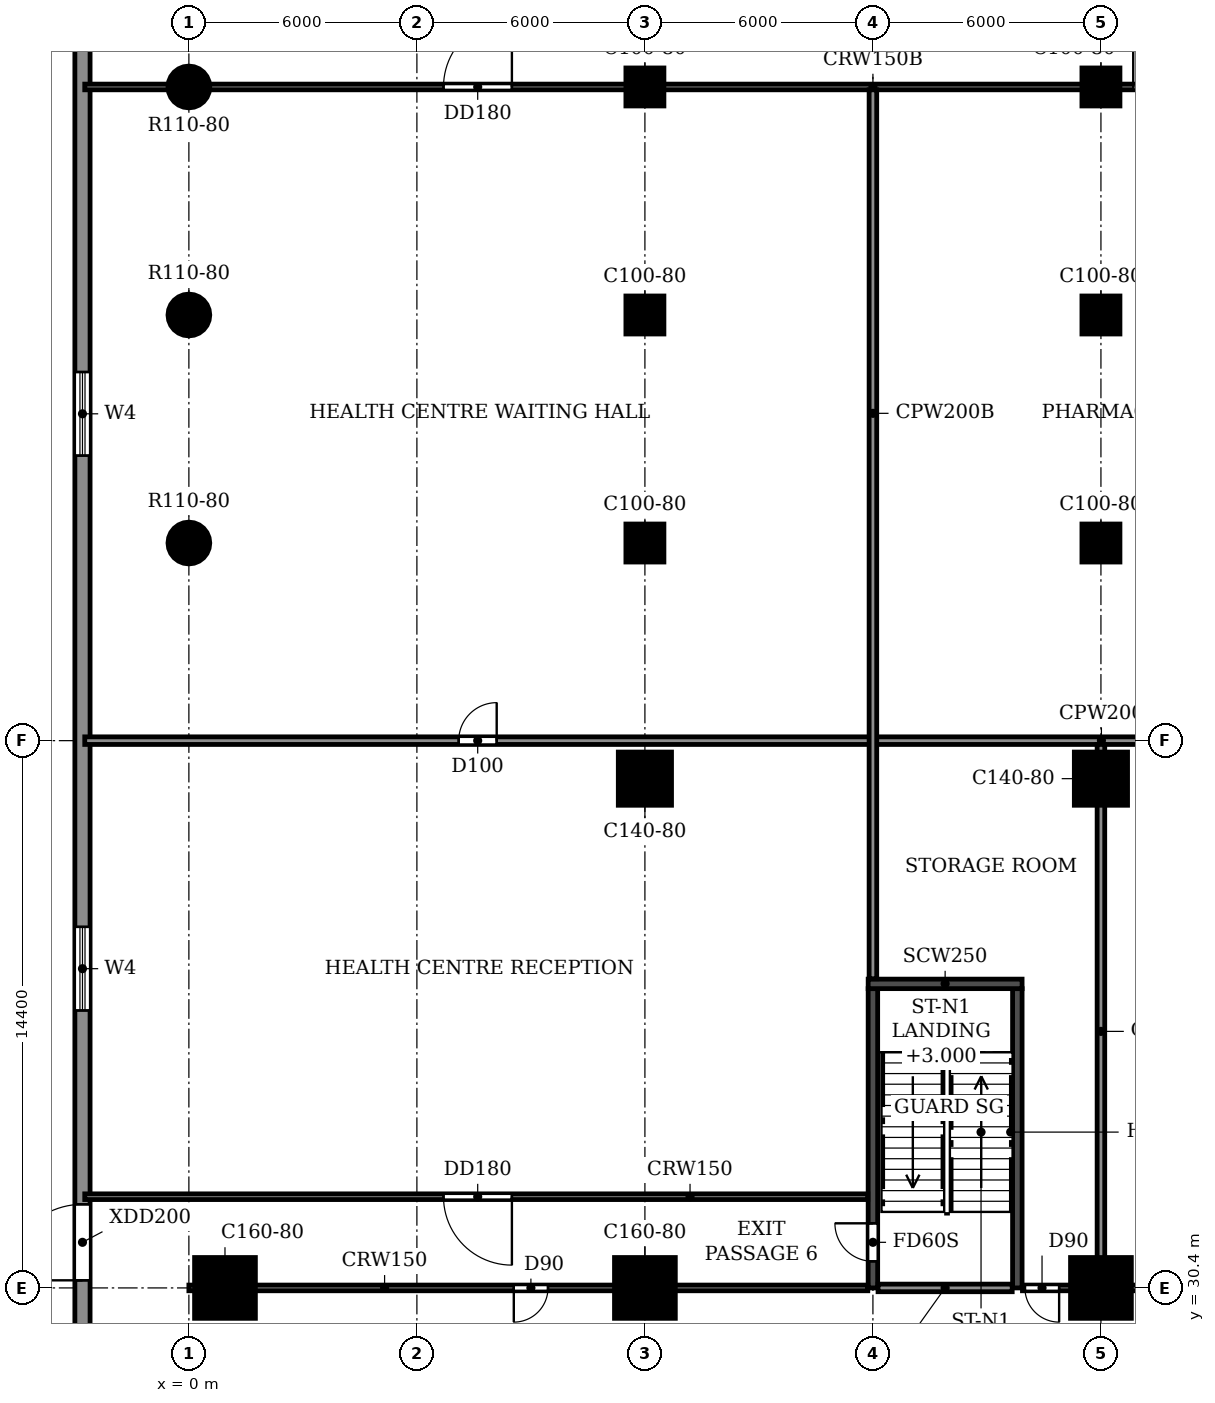
"""IFC4 building model, lengths in metres.
Left out: names, types, materials, properties, quantities, classifications, styles, units other than length and angle.
Written with IfcOpenShell. Run it as: python <this file> out.ifc"""

import sys

from ifc_helpers import new_model, si_unit, direction, frame, frame_2d, origin, origin_2d, place, context, subcontext, project, spatial, rectangle, circle, extrude, source, transform, mapped, element, fill, save


model = new_model("IFC4")
c1 = context("Model", 3, precision=1e-05, world=origin(), true_north=direction((0.0, 1.0)))
c2 = subcontext(c1, "Body", "Model", "MODEL_VIEW")
j1 = project(units=[si_unit("LENGTHUNIT", "METRE"), si_unit("PLANEANGLEUNIT", "RADIAN")], contexts=[c1])
p1 = place(None, origin())
s1 = spatial("IfcSite", under=j1, at=p1, CompositionType="ELEMENT")
p2 = place(p1, origin())
s2 = spatial("IfcBuilding", under=s1, at=p2, CompositionType="ELEMENT")
p3 = place(p2, origin())
s3 = spatial("IfcBuildingStorey", under=s2, at=p3, CompositionType="ELEMENT", Elevation=0.0)
m1 = source(origin(), c2, "Body", "SweptSolid", [
    extrude(rectangle(XDim=1.6, YDim=1.6, at=origin_2d()), origin(), (0.0, 0.0, 1.0), 4.5),
])
for number, where, z_axis, x_axis in (
    (1, (0.95, 30.4, -0.3), (0.0, 0.0, 1.0), (1.0, 0.0, 0.0)),
    (2, (12.0, 30.4, -0.3), (0.0, 0.0, 1.0), (1.0, 0.0, 0.0)),
):
    element("IfcColumn", number, at=place(p3, frame(where, z_axis=z_axis, x_axis=x_axis)), inside=s3, PredefinedType="COLUMN", context=c2, shape_type="MappedRepresentation", body=[
        mapped(m1, transform((0.0, 0.0, 0.0))),
    ])
m2 = source(origin(), c2, "Body", "SweptSolid", [
    extrude(rectangle(XDim=1.4, YDim=1.4, at=origin_2d()), origin(), (0.0, 0.0, 1.0), 4.5),
])
p4 = place(p3, frame((12.0, 43.8, -0.3), z_axis=(0.0, 0.0, 1.0), x_axis=(1.0, 0.0, 0.0)))
e3 = element("IfcColumn", 3, at=p4, inside=s3, PredefinedType="COLUMN", context=c2, shape_type="MappedRepresentation", body=[
    mapped(m2, transform((0.0, 0.0, 0.0))),
])
p5 = place(p3, frame((24.0, 30.4, -0.3), z_axis=(0.0, 0.0, 1.0), x_axis=(1.0, 0.0, 0.0)))
e4 = element("IfcColumn", 4, at=p5, inside=s3, PredefinedType="COLUMN", context=c2, shape_type="MappedRepresentation", body=[
    mapped(m1, transform((0.0, 0.0, 0.0))),
])
p6 = place(p3, frame((24.0, 43.8, -0.3), z_axis=(0.0, 0.0, 1.0), x_axis=(1.0, 0.0, 0.0)))
e5 = element("IfcColumn", 5, at=p6, inside=s3, PredefinedType="COLUMN", context=c2, shape_type="MappedRepresentation", body=[
    mapped(m2, transform((0.0, 0.0, 0.0))),
])
m3 = source(origin(), c2, "Body", "SweptSolid", [
    extrude(circle(Radius=0.55, at=origin_2d()), origin(), (0.0, 0.0, 1.0), 5.98),
])
p7 = place(p3, frame((0.0, 62.0, -0.3), z_axis=(0.0, 0.0, 1.0), x_axis=(1.0, 0.0, 0.0)))
e6 = element("IfcColumn", 6, at=p7, inside=s3, PredefinedType="COLUMN", context=c2, shape_type="MappedRepresentation", body=[
    mapped(m3, transform((0.0, 0.0, 0.0))),
])
m4 = source(origin(), c2, "Body", "SweptSolid", [
    extrude(rectangle(XDim=1.0, YDim=1.0, at=origin_2d()), origin(), (0.0, 0.0, 1.0), 5.98),
])
for number, where, z_axis, x_axis in (
    (7, (12.0, 62.0, -0.3), (0.0, 0.0, 1.0), (1.0, 0.0, 0.0)),
    (8, (24.0, 62.0, -0.3), (0.0, 0.0, 1.0), (1.0, 0.0, 0.0)),
):
    element("IfcColumn", number, at=place(p3, frame(where, z_axis=z_axis, x_axis=x_axis)), inside=s3, PredefinedType="COLUMN", context=c2, shape_type="MappedRepresentation", body=[
        mapped(m4, transform((0.0, 0.0, 0.0))),
    ])
p8 = place(p3, frame((0.0, 56.0, -0.3), z_axis=(0.0, 0.0, 1.0), x_axis=(1.0, 0.0, 0.0)))
e9 = element("IfcColumn", 9, at=p8, inside=s3, PredefinedType="COLUMN", context=c2, shape_type="MappedRepresentation", body=[
    mapped(m3, transform((0.0, 0.0, 0.0))),
])
for number, where, z_axis, x_axis in (
    (10, (12.0, 56.0, -0.3), (0.0, 0.0, 1.0), (1.0, 0.0, 0.0)),
    (11, (24.0, 56.0, -0.3), (0.0, 0.0, 1.0), (1.0, 0.0, 0.0)),
):
    element("IfcColumn", number, at=place(p3, frame(where, z_axis=z_axis, x_axis=x_axis)), inside=s3, PredefinedType="COLUMN", context=c2, shape_type="MappedRepresentation", body=[
        mapped(m4, transform((0.0, 0.0, 0.0))),
    ])
p9 = place(p3, frame((0.0, 50.0, -0.3), z_axis=(0.0, 0.0, 1.0), x_axis=(1.0, 0.0, 0.0)))
e12 = element("IfcColumn", 12, at=p9, inside=s3, PredefinedType="COLUMN", context=c2, shape_type="MappedRepresentation", body=[
    mapped(m3, transform((0.0, 0.0, 0.0))),
])
for number, where, z_axis, x_axis in (
    (13, (12.0, 50.0, -0.3), (0.0, 0.0, 1.0), (1.0, 0.0, 0.0)),
    (14, (24.0, 50.0, -0.3), (0.0, 0.0, 1.0), (1.0, 0.0, 0.0)),
):
    element("IfcColumn", number, at=place(p3, frame(where, z_axis=z_axis, x_axis=x_axis)), inside=s3, PredefinedType="COLUMN", context=c2, shape_type="MappedRepresentation", body=[
        mapped(m4, transform((0.0, 0.0, 0.0))),
    ])
p10 = place(p3, frame((21.8, 30.4, 0.0), z_axis=(0.0, 0.0, 1.0), x_axis=(0.0, 1.0, 0.0)))
e15 = element("IfcWall", 15, at=p10, inside=s3, PredefinedType="SOLIDWALL", context=c2, shape_type="SweptSolid", body=[
    extrude(rectangle(XDim=7.875, YDim=0.25, at=frame_2d((3.938, 0.0))), origin(), (0.0, 0.0, 1.0), 4.2),
])
p11 = place(p3, frame((17.875, 38.4, 0.0), z_axis=(0.0, 0.0, 1.0), x_axis=(1.0, 0.0, 0.0)))
e16 = element("IfcWall", 16, at=p11, inside=s3, PredefinedType="SOLIDWALL", context=c2, shape_type="SweptSolid", body=[
    extrude(rectangle(XDim=4.05, YDim=0.25, at=frame_2d((2.025, 0.0))), origin(), (0.0, 0.0, 1.0), 4.2),
])
p12 = place(p3, frame((18.0, 30.4, 0.0), z_axis=(0.0, 0.0, 1.0), x_axis=(0.0, 1.0, 0.0)))
e17 = element("IfcWall", 17, at=p12, inside=s3, PredefinedType="SOLIDWALL", context=c2, shape_type="SweptSolid", body=[
    extrude(rectangle(XDim=7.875, YDim=0.25, at=frame_2d((3.938, 0.0))), origin(), (0.0, 0.0, 1.0), 4.2),
])
p13 = place(p12, frame((0.7, 0.0, 0.0)))
e18 = element("IfcOpeningElement", 18, at=p13, cuts=e17, PredefinedType="OPENING", context=c2, shape_type="SweptSolid", body=[
    extrude(rectangle(XDim=1.0, YDim=2.1, at=frame_2d((0.5, 1.05))), frame((0.0, 0.135, 0.0), z_axis=(0.0, -1.0, 0.0), x_axis=(1.0, 0.0, 0.0)), (0.0, 0.0, 1.0), 0.27),
])
p14 = place(p3, frame((-2.8, 74.6, 0.0), z_axis=(0.0, 0.0, 1.0), x_axis=(0.0, -1.0, 0.0)))
e19 = element("IfcWall", 19, at=p14, inside=s3, PredefinedType="STANDARD", context=c2, shape_type="SweptSolid", body=[
    extrude(rectangle(XDim=74.4, YDim=0.4, at=frame_2d((37.2, 0.0))), origin(), (0.0, 0.0, 1.0), 5.68),
])
p15 = place(p14, frame((5.1, 0.0, 0.9)))
e20 = element("IfcOpeningElement", 20, at=p15, cuts=e19, PredefinedType="OPENING", context=c2, shape_type="SweptSolid", body=[
    extrude(rectangle(XDim=2.2, YDim=2.7, at=frame_2d((1.1, 1.35))), frame((0.0, 0.21, 0.0), z_axis=(0.0, -1.0, 0.0), x_axis=(1.0, 0.0, 0.0)), (0.0, 0.0, 1.0), 0.42),
])
p16 = place(p14, frame((34.7, 0.0, 0.9)))
e21 = element("IfcOpeningElement", 21, at=p16, cuts=e19, PredefinedType="OPENING", context=c2, shape_type="SweptSolid", body=[
    extrude(rectangle(XDim=2.2, YDim=2.7, at=frame_2d((1.1, 1.35))), frame((0.0, 0.21, 0.0), z_axis=(0.0, -1.0, 0.0), x_axis=(1.0, 0.0, 0.0)), (0.0, 0.0, 1.0), 0.42),
])
p17 = place(p14, frame((20.1, 0.0, 0.9)))
e22 = element("IfcOpeningElement", 22, at=p17, cuts=e19, PredefinedType="OPENING", context=c2, shape_type="SweptSolid", body=[
    extrude(rectangle(XDim=2.2, YDim=2.7, at=frame_2d((1.1, 1.35))), frame((0.0, 0.21, 0.0), z_axis=(0.0, -1.0, 0.0), x_axis=(1.0, 0.0, 0.0)), (0.0, 0.0, 1.0), 0.42),
])
p18 = place(p14, frame((42.0, 0.0, 0.0)))
e23 = element("IfcOpeningElement", 23, at=p18, cuts=e19, PredefinedType="OPENING", context=c2, shape_type="SweptSolid", body=[
    extrude(rectangle(XDim=2.0, YDim=2.4, at=frame_2d((1.0, 1.2))), frame((0.0, 0.21, 0.0), z_axis=(0.0, -1.0, 0.0), x_axis=(1.0, 0.0, 0.0)), (0.0, 0.0, 1.0), 0.42),
])
p19 = place(p14, frame((57.7, 0.0, 0.0)))
e24 = element("IfcOpeningElement", 24, at=p19, cuts=e19, PredefinedType="OPENING", context=c2, shape_type="SweptSolid", body=[
    extrude(rectangle(XDim=2.0, YDim=2.4, at=frame_2d((1.0, 1.2))), frame((0.0, 0.21, 0.0), z_axis=(0.0, -1.0, 0.0), x_axis=(1.0, 0.0, 0.0)), (0.0, 0.0, 1.0), 0.42),
])
p20 = place(p3, frame((0.0, 30.4, 0.0), z_axis=(0.0, 0.0, 1.0), x_axis=(1.0, 0.0, 0.0)))
e25 = element("IfcWall", 25, at=p20, inside=s3, PredefinedType="PARTITIONING", context=c2, shape_type="SweptSolid", body=[
    extrude(rectangle(XDim=17.865, YDim=0.15, at=frame_2d((8.933, 0.0))), origin(), (0.0, 0.0, 1.0), 4.2),
])
p21 = place(p20, frame((8.55, 0.0, 0.0)))
e26 = element("IfcOpeningElement", 26, at=p21, cuts=e25, PredefinedType="OPENING", context=c2, shape_type="SweptSolid", body=[
    extrude(rectangle(XDim=0.9, YDim=2.1, at=frame_2d((0.45, 1.05))), frame((0.0, 0.085, 0.0), z_axis=(0.0, -1.0, 0.0), x_axis=(1.0, 0.0, 0.0)), (0.0, 0.0, 1.0), 0.17),
])
p22 = place(p3, frame((21.935, 30.4, 0.0), z_axis=(0.0, 0.0, 1.0), x_axis=(1.0, 0.0, 0.0)))
e27 = element("IfcWall", 27, at=p22, inside=s3, PredefinedType="PARTITIONING", context=c2, shape_type="SweptSolid", body=[
    extrude(rectangle(XDim=8.165, YDim=0.15, at=frame_2d((4.083, 0.0))), origin(), (0.0, 0.0, 1.0), 4.2),
])
p23 = place(p22, frame((0.065, 0.0, 0.0)))
e28 = element("IfcOpeningElement", 28, at=p23, cuts=e27, PredefinedType="OPENING", context=c2, shape_type="SweptSolid", body=[
    extrude(rectangle(XDim=0.9, YDim=2.1, at=frame_2d((0.45, 1.05))), frame((0.0, 0.085, 0.0), z_axis=(0.0, -1.0, 0.0), x_axis=(1.0, 0.0, 0.0)), (0.0, 0.0, 1.0), 0.17),
])
p24 = place(p22, frame((4.165, 0.0, 0.0)))
e29 = element("IfcOpeningElement", 29, at=p24, cuts=e27, PredefinedType="OPENING", context=c2, shape_type="SweptSolid", body=[
    extrude(rectangle(XDim=1.8, YDim=2.1, at=frame_2d((0.9, 1.05))), frame((0.0, 0.085, 0.0), z_axis=(0.0, -1.0, 0.0), x_axis=(1.0, 0.0, 0.0)), (0.0, 0.0, 1.0), 0.17),
])
p25 = place(p3, frame((-2.74, 32.8, 0.0), z_axis=(0.0, 0.0, 1.0), x_axis=(1.0, 0.0, 0.0)))
e30 = element("IfcWall", 30, at=p25, inside=s3, PredefinedType="PARTITIONING", context=c2, shape_type="SweptSolid", body=[
    extrude(rectangle(XDim=20.605, YDim=0.15, at=frame_2d((10.302, 0.0))), origin(), (0.0, 0.0, 1.0), 4.2),
])
p26 = place(p25, frame((9.44, 0.0, 0.0)))
e31 = element("IfcOpeningElement", 31, at=p26, cuts=e30, PredefinedType="OPENING", context=c2, shape_type="SweptSolid", body=[
    extrude(rectangle(XDim=1.8, YDim=2.1, at=frame_2d((0.9, 1.05))), frame((0.0, 0.085, 0.0), z_axis=(0.0, -1.0, 0.0), x_axis=(1.0, 0.0, 0.0)), (0.0, 0.0, 1.0), 0.17),
])
p27 = place(p3, frame((-2.74, 62.0, 0.0), z_axis=(0.0, 0.0, 1.0), x_axis=(1.0, 0.0, 0.0)))
e32 = element("IfcWall", 32, at=p27, inside=s3, PredefinedType="PARTITIONING", context=c2, shape_type="SweptSolid", body=[
    extrude(rectangle(XDim=50.665, YDim=0.15, at=frame_2d((25.333, 0.0))), origin(), (0.0, 0.0, 1.0), 5.68),
])
p28 = place(p27, frame((9.44, 0.0, 0.0)))
e33 = element("IfcOpeningElement", 33, at=p28, cuts=e32, PredefinedType="OPENING", context=c2, shape_type="SweptSolid", body=[
    extrude(rectangle(XDim=1.8, YDim=2.1, at=frame_2d((0.9, 1.05))), frame((0.0, 0.085, 0.0), z_axis=(0.0, -1.0, 0.0), x_axis=(1.0, 0.0, 0.0)), (0.0, 0.0, 1.0), 0.17),
])
p29 = place(p27, frame((27.59, 0.0, 0.0)))
e34 = element("IfcOpeningElement", 34, at=p29, cuts=e32, PredefinedType="OPENING", context=c2, shape_type="SweptSolid", body=[
    extrude(rectangle(XDim=1.0, YDim=2.1, at=frame_2d((0.5, 1.05))), frame((0.0, 0.085, 0.0), z_axis=(0.0, -1.0, 0.0), x_axis=(1.0, 0.0, 0.0)), (0.0, 0.0, 1.0), 0.17),
])
p30 = place(p27, frame((40.84, 0.0, 0.0)))
e35 = element("IfcOpeningElement", 35, at=p30, cuts=e32, PredefinedType="OPENING", context=c2, shape_type="SweptSolid", body=[
    extrude(rectangle(XDim=1.8, YDim=2.1, at=frame_2d((0.9, 1.05))), frame((0.0, 0.085, 0.0), z_axis=(0.0, -1.0, 0.0), x_axis=(1.0, 0.0, 0.0)), (0.0, 0.0, 1.0), 0.17),
])
p31 = place(p3, frame((-2.74, 44.8, 0.0), z_axis=(0.0, 0.0, 1.0), x_axis=(1.0, 0.0, 0.0)))
e36 = element("IfcWall", 36, at=p31, inside=s3, PredefinedType="PARTITIONING", context=c2, shape_type="SweptSolid", body=[
    extrude(rectangle(XDim=32.665, YDim=0.2, at=frame_2d((16.333, 0.0))), origin(), (0.0, 0.0, 1.0), 4.2),
])
p32 = place(p31, frame((9.84, 0.0, 0.0)))
e37 = element("IfcOpeningElement", 37, at=p32, cuts=e36, PredefinedType="OPENING", context=c2, shape_type="SweptSolid", body=[
    extrude(rectangle(XDim=1.0, YDim=2.1, at=frame_2d((0.5, 1.05))), frame((0.0, 0.11, 0.0), z_axis=(0.0, -1.0, 0.0), x_axis=(1.0, 0.0, 0.0)), (0.0, 0.0, 1.0), 0.22),
])
p33 = place(p3, frame((18.0, 38.535, 0.0), z_axis=(0.0, 0.0, 1.0), x_axis=(0.0, 1.0, 0.0)))
e38 = element("IfcWall", 38, at=p33, inside=s3, PredefinedType="PARTITIONING", context=c2, shape_type="SweptSolid", body=[
    extrude(rectangle(XDim=23.39, YDim=0.2, at=frame_2d((11.695, 0.0))), origin(), (0.0, 0.0, 1.0), 5.68),
])
p34 = place(p3, frame((24.0, 30.475, 0.0), z_axis=(0.0, 0.0, 1.0), x_axis=(0.0, 1.0, 0.0)))
e39 = element("IfcWall", 39, at=p34, inside=s3, PredefinedType="PARTITIONING", context=c2, shape_type="SweptSolid", body=[
    extrude(rectangle(XDim=14.225, YDim=0.2, at=frame_2d((7.112, 0.0))), origin(), (0.0, 0.0, 1.0), 4.2),
])
p35 = place(p3, frame((18.135, 30.4, 0.0), z_axis=(0.0, 0.0, 1.0), x_axis=(1.0, 0.0, 0.0)))
e40 = element("IfcWall", 40, at=p35, inside=s3, PredefinedType="PARTITIONING", context=c2, shape_type="SweptSolid", body=[
    extrude(rectangle(XDim=3.53, YDim=0.2, at=frame_2d((1.765, 0.0))), origin(), (0.0, 0.0, 1.0), 4.2),
])
p36 = place(p16, origin())
e41 = element("IfcWindow", 41, at=p36, inside=s3, PartitioningType="DOUBLE_PANEL_HORIZONTAL", PredefinedType="WINDOW", context=c2, shape_type="SweptSolid", body=[
    extrude(rectangle(XDim=2.2, YDim=2.7, at=frame_2d((1.1, 1.35))), frame((0.0, 0.03, 0.0), z_axis=(0.0, -1.0, 0.0), x_axis=(1.0, 0.0, 0.0)), (0.0, 0.0, 1.0), 0.06),
])
fill(e21, e41)
p37 = place(p17, origin())
e42 = element("IfcWindow", 42, at=p37, inside=s3, PartitioningType="DOUBLE_PANEL_HORIZONTAL", PredefinedType="WINDOW", context=c2, shape_type="SweptSolid", body=[
    extrude(rectangle(XDim=2.2, YDim=2.7, at=frame_2d((1.1, 1.35))), frame((0.0, 0.03, 0.0), z_axis=(0.0, -1.0, 0.0), x_axis=(1.0, 0.0, 0.0)), (0.0, 0.0, 1.0), 0.06),
])
fill(e22, e42)
p38 = place(p21, frame((0.9, 0.0, 0.0), z_axis=(0.0, 0.0, 1.0), x_axis=(-1.0, 0.0, 0.0)))
e43 = element("IfcDoor", 43, at=p38, inside=s3, OperationType="SINGLE_SWING_RIGHT", PredefinedType="DOOR", context=c2, shape_type="SweptSolid", body=[
    extrude(rectangle(XDim=0.9, YDim=2.1, at=frame_2d((0.45, 1.05))), frame((0.0, 0.025, 0.0), z_axis=(0.0, -1.0, 0.0), x_axis=(1.0, 0.0, 0.0)), (0.0, 0.0, 1.0), 0.05),
])
fill(e26, e43)
p39 = place(p23, frame((0.9, 0.0, 0.0), z_axis=(0.0, 0.0, 1.0), x_axis=(-1.0, 0.0, 0.0)))
e44 = element("IfcDoor", 44, at=p39, inside=s3, OperationType="SINGLE_SWING_LEFT", PredefinedType="DOOR", context=c2, shape_type="SweptSolid", body=[
    extrude(rectangle(XDim=0.9, YDim=2.1, at=frame_2d((0.45, 1.05))), frame((0.0, 0.025, 0.0), z_axis=(0.0, -1.0, 0.0), x_axis=(1.0, 0.0, 0.0)), (0.0, 0.0, 1.0), 0.05),
])
fill(e28, e44)
p40 = place(p28, origin())
e45 = element("IfcDoor", 45, at=p40, inside=s3, OperationType="DOUBLE_DOOR_SINGLE_SWING", PredefinedType="DOOR", context=c2, shape_type="SweptSolid", body=[
    extrude(rectangle(XDim=1.8, YDim=2.1, at=frame_2d((0.9, 1.05))), frame((0.0, 0.025, 0.0), z_axis=(0.0, -1.0, 0.0), x_axis=(1.0, 0.0, 0.0)), (0.0, 0.0, 1.0), 0.05),
])
fill(e33, e45)
p41 = place(p29, origin())
e46 = element("IfcDoor", 46, at=p41, inside=s3, OperationType="SINGLE_SWING_LEFT", PredefinedType="DOOR", context=c2, shape_type="SweptSolid", body=[
    extrude(rectangle(XDim=1.0, YDim=2.1, at=frame_2d((0.5, 1.05))), frame((0.0, 0.025, 0.0), z_axis=(0.0, -1.0, 0.0), x_axis=(1.0, 0.0, 0.0)), (0.0, 0.0, 1.0), 0.05),
])
fill(e34, e46)
p42 = place(p32, origin())
e47 = element("IfcDoor", 47, at=p42, inside=s3, OperationType="SINGLE_SWING_RIGHT", PredefinedType="DOOR", context=c2, shape_type="SweptSolid", body=[
    extrude(rectangle(XDim=1.0, YDim=2.1, at=frame_2d((0.5, 1.05))), frame((0.0, 0.025, 0.0), z_axis=(0.0, -1.0, 0.0), x_axis=(1.0, 0.0, 0.0)), (0.0, 0.0, 1.0), 0.05),
])
fill(e37, e47)
p43 = place(p13, origin())
e48 = element("IfcDoor", 48, at=p43, inside=s3, OperationType="SINGLE_SWING_RIGHT", PredefinedType="DOOR", context=c2, shape_type="SweptSolid", body=[
    extrude(rectangle(XDim=1.0, YDim=2.1, at=frame_2d((0.5, 1.05))), frame((0.0, 0.025, 0.0), z_axis=(0.0, -1.0, 0.0), x_axis=(1.0, 0.0, 0.0)), (0.0, 0.0, 1.0), 0.05),
])
fill(e18, e48)
p44 = place(p18, frame((2.0, 0.0, 0.0), z_axis=(0.0, 0.0, 1.0), x_axis=(-1.0, 0.0, 0.0)))
e49 = element("IfcDoor", 49, at=p44, inside=s3, OperationType="DOUBLE_DOOR_SINGLE_SWING", PredefinedType="DOOR", context=c2, shape_type="SweptSolid", body=[
    extrude(rectangle(XDim=2.0, YDim=2.4, at=frame_2d((1.0, 1.2))), frame((0.0, 0.025, 0.0), z_axis=(0.0, -1.0, 0.0), x_axis=(1.0, 0.0, 0.0)), (0.0, 0.0, 1.0), 0.05),
])
fill(e23, e49)
p45 = place(p26, frame((1.8, 0.0, 0.0), z_axis=(0.0, 0.0, 1.0), x_axis=(-1.0, 0.0, 0.0)))
e50 = element("IfcDoor", 50, at=p45, inside=s3, OperationType="DOUBLE_DOOR_SINGLE_SWING", PredefinedType="DOOR", context=c2, shape_type="SweptSolid", body=[
    extrude(rectangle(XDim=1.8, YDim=2.1, at=frame_2d((0.9, 1.05))), frame((0.0, 0.025, 0.0), z_axis=(0.0, -1.0, 0.0), x_axis=(1.0, 0.0, 0.0)), (0.0, 0.0, 1.0), 0.05),
])
fill(e31, e50)
save(model, sys.argv[1])
